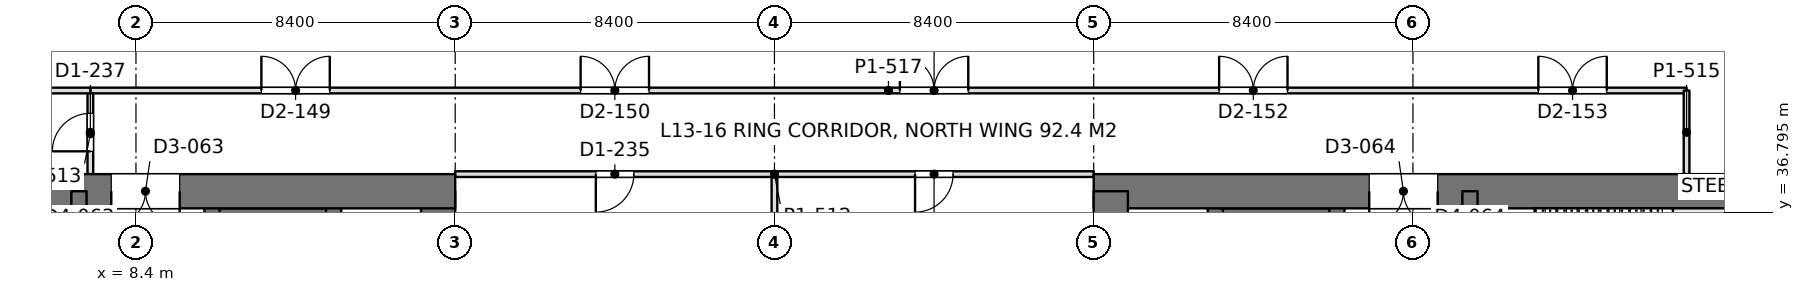
"""IFC4 building model, lengths in metres.
Left out: names, types, materials, properties, quantities, classifications, styles, units other than length and angle.
Written with IfcOpenShell. Run it as: python <this file> out.ifc"""

import sys

from ifc_helpers import new_model, si_unit, direction, frame, frame_2d, origin, place, context, subcontext, project, spatial, rectangle, extrude, element, fill, save


model = new_model("IFC4")
c1 = context("Model", 3, precision=1e-05, world=origin(), true_north=direction((0.0, 1.0)))
c2 = subcontext(c1, "Body", "Model", "MODEL_VIEW")
j1 = project(units=[si_unit("LENGTHUNIT", "METRE"), si_unit("PLANEANGLEUNIT", "RADIAN")], contexts=[c1])
p1 = place(None, origin())
s1 = spatial("IfcSite", under=j1, at=p1, CompositionType="ELEMENT")
p2 = place(p1, origin())
s2 = spatial("IfcBuilding", under=s1, at=p2, CompositionType="ELEMENT")
p3 = place(p2, frame((0.0, 0.0, 59.4)))
s3 = spatial("IfcBuildingStorey", under=s2, at=p3, CompositionType="ELEMENT", Elevation=59.4)
p4 = place(p3, frame((-1.2, 37.35, 0.0), z_axis=(0.0, 0.0, 1.0), x_axis=(1.0, 0.0, 0.0)))
e1 = element("IfcWall", 1, at=p4, inside=s3, PredefinedType="SHEAR", context=c2, shape_type="SweptSolid", body=[
    extrude(rectangle(XDim=18.0, YDim=0.9, at=frame_2d((9.0, 0.0))), origin(), (0.0, 0.0, 1.0), 4.5),
])
p5 = place(p4, frame((8.95, 0.0, 0.0)))
e2 = element("IfcOpeningElement", 2, at=p5, cuts=e1, PredefinedType="OPENING", context=c2, shape_type="SweptSolid", body=[
    extrude(rectangle(XDim=1.8, YDim=2.4, at=frame_2d((0.9, 1.2))), frame((0.0, 0.46, 0.0), z_axis=(0.0, -1.0, 0.0), x_axis=(1.0, 0.0, 0.0)), (0.0, 0.0, 1.0), 0.92),
])
p6 = place(p3, frame((16.35, 13.05, 0.0), z_axis=(0.0, 0.0, 1.0), x_axis=(0.0, 1.0, 0.0)))
e3 = element("IfcWall", 3, at=p6, inside=s3, PredefinedType="SHEAR", context=c2, shape_type="SweptSolid", body=[
    extrude(rectangle(XDim=24.3, YDim=0.9, at=frame_2d((12.15, 0.0))), origin(), (0.0, 0.0, 1.0), 4.5),
])
p7 = place(p3, frame((6.9, 13.05, 0.0), z_axis=(0.0, 0.0, 1.0), x_axis=(0.0, 1.0, 0.0)))
e4 = element("IfcWall", 4, at=p7, inside=s3, PredefinedType="SHEAR", context=c2, shape_type="SweptSolid", body=[
    extrude(rectangle(XDim=24.3, YDim=0.4, at=frame_2d((12.15, 0.0))), origin(), (0.0, 0.0, 1.0), 4.5),
])
p8 = place(p7, frame((1.3, 0.0, 0.0)))
e5 = element("IfcOpeningElement", 5, at=p8, cuts=e4, PredefinedType="OPENING", context=c2, shape_type="SweptSolid", body=[
    extrude(rectangle(XDim=1.0, YDim=2.2, at=frame_2d((0.5, 1.1))), frame((0.0, 0.21, 0.0), z_axis=(0.0, -1.0, 0.0), x_axis=(1.0, 0.0, 0.0)), (0.0, 0.0, 1.0), 0.42),
])
p9 = place(p7, frame((22.0, 0.0, 0.0)))
e6 = element("IfcOpeningElement", 6, at=p9, cuts=e4, PredefinedType="OPENING", context=c2, shape_type="SweptSolid", body=[
    extrude(rectangle(XDim=1.0, YDim=2.2, at=frame_2d((0.5, 1.1))), frame((0.0, 0.21, 0.0), z_axis=(0.0, -1.0, 0.0), x_axis=(1.0, 0.0, 0.0)), (0.0, 0.0, 1.0), 0.42),
])
p10 = place(p7, frame((5.55, 0.0, 0.0)))
e7 = element("IfcOpeningElement", 7, at=p10, cuts=e4, PredefinedType="OPENING", context=c2, shape_type="SweptSolid", body=[
    extrude(rectangle(XDim=1.0, YDim=2.2, at=frame_2d((0.5, 1.1))), frame((0.0, 0.21, 0.0), z_axis=(0.0, -1.0, 0.0), x_axis=(1.0, 0.0, 0.0)), (0.0, 0.0, 1.0), 0.42),
])
p11 = place(p7, frame((9.55, 0.0, 0.0)))
e8 = element("IfcOpeningElement", 8, at=p11, cuts=e4, PredefinedType="OPENING", context=c2, shape_type="SweptSolid", body=[
    extrude(rectangle(XDim=1.0, YDim=2.2, at=frame_2d((0.5, 1.1))), frame((0.0, 0.21, 0.0), z_axis=(0.0, -1.0, 0.0), x_axis=(1.0, 0.0, 0.0)), (0.0, 0.0, 1.0), 0.42),
])
p12 = place(p7, frame((12.8, 0.0, 0.0)))
e9 = element("IfcOpeningElement", 9, at=p12, cuts=e4, PredefinedType="OPENING", context=c2, shape_type="SweptSolid", body=[
    extrude(rectangle(XDim=1.1, YDim=2.2, at=frame_2d((0.55, 1.1))), frame((0.0, 0.21, 0.0), z_axis=(0.0, -1.0, 0.0), x_axis=(1.0, 0.0, 0.0)), (0.0, 0.0, 1.0), 0.42),
])
p13 = place(p7, frame((15.538, 0.0, 0.0)))
e10 = element("IfcOpeningElement", 10, at=p13, cuts=e4, PredefinedType="OPENING", context=c2, shape_type="SweptSolid", body=[
    extrude(rectangle(XDim=1.1, YDim=2.2, at=frame_2d((0.55, 1.1))), frame((0.0, 0.21, 0.0), z_axis=(0.0, -1.0, 0.0), x_axis=(1.0, 0.0, 0.0)), (0.0, 0.0, 1.0), 0.42),
])
p14 = place(p7, frame((18.262, 0.0, 0.0)))
e11 = element("IfcOpeningElement", 11, at=p14, cuts=e4, PredefinedType="OPENING", context=c2, shape_type="SweptSolid", body=[
    extrude(rectangle(XDim=1.1, YDim=2.2, at=frame_2d((0.55, 1.1))), frame((0.0, 0.21, 0.0), z_axis=(0.0, -1.0, 0.0), x_axis=(1.0, 0.0, 0.0)), (0.0, 0.0, 1.0), 0.42),
])
p15 = place(p3, frame((10.4, 13.05, 0.0), z_axis=(0.0, 0.0, 1.0), x_axis=(0.0, 1.0, 0.0)))
e12 = element("IfcWall", 12, at=p15, inside=s3, PredefinedType="SHEAR", context=c2, shape_type="SweptSolid", body=[
    extrude(rectangle(XDim=24.3, YDim=0.4, at=frame_2d((12.15, 0.0))), origin(), (0.0, 0.0, 1.0), 4.5),
])
p16 = place(p15, frame((1.5, 0.0, 0.0)))
e13 = element("IfcOpeningElement", 13, at=p16, cuts=e12, PredefinedType="OPENING", context=c2, shape_type="SweptSolid", body=[
    extrude(rectangle(XDim=1.1, YDim=2.2, at=frame_2d((0.55, 1.1))), frame((0.0, 0.21, 0.0), z_axis=(0.0, -1.0, 0.0), x_axis=(1.0, 0.0, 0.0)), (0.0, 0.0, 1.0), 0.42),
])
p17 = place(p15, frame((4.35, 0.0, 0.0)))
e14 = element("IfcOpeningElement", 14, at=p17, cuts=e12, PredefinedType="OPENING", context=c2, shape_type="SweptSolid", body=[
    extrude(rectangle(XDim=1.1, YDim=2.2, at=frame_2d((0.55, 1.1))), frame((0.0, 0.21, 0.0), z_axis=(0.0, -1.0, 0.0), x_axis=(1.0, 0.0, 0.0)), (0.0, 0.0, 1.0), 0.42),
])
p18 = place(p15, frame((7.2, 0.0, 0.0)))
e15 = element("IfcOpeningElement", 15, at=p18, cuts=e12, PredefinedType="OPENING", context=c2, shape_type="SweptSolid", body=[
    extrude(rectangle(XDim=1.1, YDim=2.2, at=frame_2d((0.55, 1.1))), frame((0.0, 0.21, 0.0), z_axis=(0.0, -1.0, 0.0), x_axis=(1.0, 0.0, 0.0)), (0.0, 0.0, 1.0), 0.42),
])
p19 = place(p15, frame((21.45, 0.0, 0.0)))
e16 = element("IfcOpeningElement", 16, at=p19, cuts=e12, PredefinedType="OPENING", context=c2, shape_type="SweptSolid", body=[
    extrude(rectangle(XDim=1.1, YDim=2.2, at=frame_2d((0.55, 1.1))), frame((0.0, 0.21, 0.0), z_axis=(0.0, -1.0, 0.0), x_axis=(1.0, 0.0, 0.0)), (0.0, 0.0, 1.0), 0.42),
])
p20 = place(p3, frame((13.6, 13.05, 0.0), z_axis=(0.0, 0.0, 1.0), x_axis=(0.0, 1.0, 0.0)))
e17 = element("IfcWall", 17, at=p20, inside=s3, PredefinedType="SHEAR", context=c2, shape_type="SweptSolid", body=[
    extrude(rectangle(XDim=24.3, YDim=0.4, at=frame_2d((12.15, 0.0))), origin(), (0.0, 0.0, 1.0), 4.5),
])
p21 = place(p3, frame((10.4, 36.625, 0.0), z_axis=(0.0, 0.0, 1.0), x_axis=(1.0, 0.0, 0.0)))
e18 = element("IfcWall", 18, at=p21, inside=s3, PredefinedType="SHEAR", context=c2, shape_type="SweptSolid", body=[
    extrude(rectangle(XDim=3.2, YDim=0.55, at=frame_2d((1.6, 0.0))), origin(), (0.0, 0.0, 1.0), 4.5),
])
p22 = place(p3, frame((33.6, 37.35, 0.0), z_axis=(0.0, 0.0, 1.0), x_axis=(1.0, 0.0, 0.0)))
e19 = element("IfcWall", 19, at=p22, inside=s3, PredefinedType="SHEAR", context=c2, shape_type="SweptSolid", body=[
    extrude(rectangle(XDim=18.0, YDim=0.9, at=frame_2d((9.0, 0.0))), origin(), (0.0, 0.0, 1.0), 4.5),
])
p23 = place(p22, frame((7.25, 0.0, 0.0)))
e20 = element("IfcOpeningElement", 20, at=p23, cuts=e19, PredefinedType="OPENING", context=c2, shape_type="SweptSolid", body=[
    extrude(rectangle(XDim=1.8, YDim=2.4, at=frame_2d((0.9, 1.2))), frame((0.0, 0.46, 0.0), z_axis=(0.0, -1.0, 0.0), x_axis=(1.0, 0.0, 0.0)), (0.0, 0.0, 1.0), 0.92),
])
p24 = place(p3, frame((34.05, 13.05, 0.0), z_axis=(0.0, 0.0, 1.0), x_axis=(0.0, 1.0, 0.0)))
e21 = element("IfcWall", 21, at=p24, inside=s3, PredefinedType="SHEAR", context=c2, shape_type="SweptSolid", body=[
    extrude(rectangle(XDim=24.3, YDim=0.9, at=frame_2d((12.15, 0.0))), origin(), (0.0, 0.0, 1.0), 4.5),
])
p25 = place(p3, frame((43.5, 13.05, 0.0), z_axis=(0.0, 0.0, 1.0), x_axis=(0.0, 1.0, 0.0)))
e22 = element("IfcWall", 22, at=p25, inside=s3, PredefinedType="SHEAR", context=c2, shape_type="SweptSolid", body=[
    extrude(rectangle(XDim=24.3, YDim=0.4, at=frame_2d((12.15, 0.0))), origin(), (0.0, 0.0, 1.0), 4.5),
])
p26 = place(p25, frame((1.3, 0.0, 0.0)))
e23 = element("IfcOpeningElement", 23, at=p26, cuts=e22, PredefinedType="OPENING", context=c2, shape_type="SweptSolid", body=[
    extrude(rectangle(XDim=1.0, YDim=2.2, at=frame_2d((0.5, 1.1))), frame((0.0, 0.21, 0.0), z_axis=(0.0, -1.0, 0.0), x_axis=(1.0, 0.0, 0.0)), (0.0, 0.0, 1.0), 0.42),
])
p27 = place(p25, frame((22.0, 0.0, 0.0)))
e24 = element("IfcOpeningElement", 24, at=p27, cuts=e22, PredefinedType="OPENING", context=c2, shape_type="SweptSolid", body=[
    extrude(rectangle(XDim=1.0, YDim=2.2, at=frame_2d((0.5, 1.1))), frame((0.0, 0.21, 0.0), z_axis=(0.0, -1.0, 0.0), x_axis=(1.0, 0.0, 0.0)), (0.0, 0.0, 1.0), 0.42),
])
p28 = place(p25, frame((5.55, 0.0, 0.0)))
e25 = element("IfcOpeningElement", 25, at=p28, cuts=e22, PredefinedType="OPENING", context=c2, shape_type="SweptSolid", body=[
    extrude(rectangle(XDim=1.0, YDim=2.2, at=frame_2d((0.5, 1.1))), frame((0.0, 0.21, 0.0), z_axis=(0.0, -1.0, 0.0), x_axis=(1.0, 0.0, 0.0)), (0.0, 0.0, 1.0), 0.42),
])
p29 = place(p25, frame((9.55, 0.0, 0.0)))
e26 = element("IfcOpeningElement", 26, at=p29, cuts=e22, PredefinedType="OPENING", context=c2, shape_type="SweptSolid", body=[
    extrude(rectangle(XDim=1.0, YDim=2.2, at=frame_2d((0.5, 1.1))), frame((0.0, 0.21, 0.0), z_axis=(0.0, -1.0, 0.0), x_axis=(1.0, 0.0, 0.0)), (0.0, 0.0, 1.0), 0.42),
])
p30 = place(p25, frame((12.8, 0.0, 0.0)))
e27 = element("IfcOpeningElement", 27, at=p30, cuts=e22, PredefinedType="OPENING", context=c2, shape_type="SweptSolid", body=[
    extrude(rectangle(XDim=1.1, YDim=2.2, at=frame_2d((0.55, 1.1))), frame((0.0, 0.21, 0.0), z_axis=(0.0, -1.0, 0.0), x_axis=(1.0, 0.0, 0.0)), (0.0, 0.0, 1.0), 0.42),
])
p31 = place(p25, frame((15.538, 0.0, 0.0)))
e28 = element("IfcOpeningElement", 28, at=p31, cuts=e22, PredefinedType="OPENING", context=c2, shape_type="SweptSolid", body=[
    extrude(rectangle(XDim=1.1, YDim=2.2, at=frame_2d((0.55, 1.1))), frame((0.0, 0.21, 0.0), z_axis=(0.0, -1.0, 0.0), x_axis=(1.0, 0.0, 0.0)), (0.0, 0.0, 1.0), 0.42),
])
p32 = place(p25, frame((18.262, 0.0, 0.0)))
e29 = element("IfcOpeningElement", 29, at=p32, cuts=e22, PredefinedType="OPENING", context=c2, shape_type="SweptSolid", body=[
    extrude(rectangle(XDim=1.1, YDim=2.2, at=frame_2d((0.55, 1.1))), frame((0.0, 0.21, 0.0), z_axis=(0.0, -1.0, 0.0), x_axis=(1.0, 0.0, 0.0)), (0.0, 0.0, 1.0), 0.42),
])
p33 = place(p3, frame((40.0, 13.05, 0.0), z_axis=(0.0, 0.0, 1.0), x_axis=(0.0, 1.0, 0.0)))
e30 = element("IfcWall", 30, at=p33, inside=s3, PredefinedType="SHEAR", context=c2, shape_type="SweptSolid", body=[
    extrude(rectangle(XDim=24.3, YDim=0.4, at=frame_2d((12.15, 0.0))), origin(), (0.0, 0.0, 1.0), 4.5),
])
p34 = place(p33, frame((1.5, 0.0, 0.0)))
e31 = element("IfcOpeningElement", 31, at=p34, cuts=e30, PredefinedType="OPENING", context=c2, shape_type="SweptSolid", body=[
    extrude(rectangle(XDim=1.1, YDim=2.2, at=frame_2d((0.55, 1.1))), frame((0.0, 0.21, 0.0), z_axis=(0.0, -1.0, 0.0), x_axis=(1.0, 0.0, 0.0)), (0.0, 0.0, 1.0), 0.42),
])
p35 = place(p33, frame((4.35, 0.0, 0.0)))
e32 = element("IfcOpeningElement", 32, at=p35, cuts=e30, PredefinedType="OPENING", context=c2, shape_type="SweptSolid", body=[
    extrude(rectangle(XDim=1.1, YDim=2.2, at=frame_2d((0.55, 1.1))), frame((0.0, 0.21, 0.0), z_axis=(0.0, -1.0, 0.0), x_axis=(1.0, 0.0, 0.0)), (0.0, 0.0, 1.0), 0.42),
])
p36 = place(p33, frame((7.2, 0.0, 0.0)))
e33 = element("IfcOpeningElement", 33, at=p36, cuts=e30, PredefinedType="OPENING", context=c2, shape_type="SweptSolid", body=[
    extrude(rectangle(XDim=1.1, YDim=2.2, at=frame_2d((0.55, 1.1))), frame((0.0, 0.21, 0.0), z_axis=(0.0, -1.0, 0.0), x_axis=(1.0, 0.0, 0.0)), (0.0, 0.0, 1.0), 0.42),
])
p37 = place(p33, frame((21.45, 0.0, 0.0)))
e34 = element("IfcOpeningElement", 34, at=p37, cuts=e30, PredefinedType="OPENING", context=c2, shape_type="SweptSolid", body=[
    extrude(rectangle(XDim=1.1, YDim=2.2, at=frame_2d((0.55, 1.1))), frame((0.0, 0.21, 0.0), z_axis=(0.0, -1.0, 0.0), x_axis=(1.0, 0.0, 0.0)), (0.0, 0.0, 1.0), 0.42),
])
p38 = place(p3, frame((36.8, 13.05, 0.0), z_axis=(0.0, 0.0, 1.0), x_axis=(0.0, 1.0, 0.0)))
e35 = element("IfcWall", 35, at=p38, inside=s3, PredefinedType="SHEAR", context=c2, shape_type="SweptSolid", body=[
    extrude(rectangle(XDim=24.3, YDim=0.4, at=frame_2d((12.15, 0.0))), origin(), (0.0, 0.0, 1.0), 4.5),
])
p39 = place(p3, frame((40.0, 36.625, 0.0), z_axis=(0.0, 0.0, 1.0), x_axis=(-1.0, 0.0, 0.0)))
e36 = element("IfcWall", 36, at=p39, inside=s3, PredefinedType="SHEAR", context=c2, shape_type="SweptSolid", body=[
    extrude(rectangle(XDim=3.2, YDim=0.55, at=frame_2d((1.6, 0.0))), origin(), (0.0, 0.0, 1.0), 4.5),
])
p40 = place(p3, frame((7.198, 40.0, 0.0), z_axis=(0.0, 0.0, 1.0), x_axis=(1.0, 0.0, 0.0)))
e37 = element("IfcWall", 37, at=p40, inside=s3, PredefinedType="PARTITIONING", context=c2, shape_type="SweptSolid", body=[
    extrude(rectangle(XDim=42.002, YDim=0.15, at=frame_2d((21.001, 0.0))), origin(), (0.0, 0.0, 1.0), 3.74),
])
p41 = place(p40, frame((4.502, 0.0, 0.0)))
e38 = element("IfcOpeningElement", 38, at=p41, cuts=e37, PredefinedType="OPENING", context=c2, shape_type="SweptSolid", body=[
    extrude(rectangle(XDim=1.8, YDim=2.2, at=frame_2d((0.9, 1.1))), frame((0.0, 0.085, 0.0), z_axis=(0.0, -1.0, 0.0), x_axis=(1.0, 0.0, 0.0)), (0.0, 0.0, 1.0), 0.17),
])
p42 = place(p40, frame((12.902, 0.0, 0.0)))
e39 = element("IfcOpeningElement", 39, at=p42, cuts=e37, PredefinedType="OPENING", context=c2, shape_type="SweptSolid", body=[
    extrude(rectangle(XDim=1.8, YDim=2.2, at=frame_2d((0.9, 1.1))), frame((0.0, 0.085, 0.0), z_axis=(0.0, -1.0, 0.0), x_axis=(1.0, 0.0, 0.0)), (0.0, 0.0, 1.0), 0.17),
])
p43 = place(p40, frame((21.302, 0.0, 0.0)))
e40 = element("IfcOpeningElement", 40, at=p43, cuts=e37, PredefinedType="OPENING", context=c2, shape_type="SweptSolid", body=[
    extrude(rectangle(XDim=1.8, YDim=2.2, at=frame_2d((0.9, 1.1))), frame((0.0, 0.085, 0.0), z_axis=(0.0, -1.0, 0.0), x_axis=(1.0, 0.0, 0.0)), (0.0, 0.0, 1.0), 0.17),
])
p44 = place(p40, frame((29.702, 0.0, 0.0)))
e41 = element("IfcOpeningElement", 41, at=p44, cuts=e37, PredefinedType="OPENING", context=c2, shape_type="SweptSolid", body=[
    extrude(rectangle(XDim=1.8, YDim=2.2, at=frame_2d((0.9, 1.1))), frame((0.0, 0.085, 0.0), z_axis=(0.0, -1.0, 0.0), x_axis=(1.0, 0.0, 0.0)), (0.0, 0.0, 1.0), 0.17),
])
p45 = place(p40, frame((38.102, 0.0, 0.0)))
e42 = element("IfcOpeningElement", 42, at=p45, cuts=e37, PredefinedType="OPENING", context=c2, shape_type="SweptSolid", body=[
    extrude(rectangle(XDim=1.8, YDim=2.2, at=frame_2d((0.9, 1.1))), frame((0.0, 0.085, 0.0), z_axis=(0.0, -1.0, 0.0), x_axis=(1.0, 0.0, 0.0)), (0.0, 0.0, 1.0), 0.17),
])
p46 = place(p3, frame((7.2, 37.8, 0.0), z_axis=(0.0, 0.0, 1.0), x_axis=(0.0, 1.0, 0.0)))
e43 = element("IfcWall", 43, at=p46, inside=s3, PredefinedType="PARTITIONING", context=c2, shape_type="SweptSolid", body=[
    extrude(rectangle(XDim=2.126, YDim=0.15, at=frame_2d((1.063, 0.0))), origin(), (0.0, 0.0, 1.0), 4.34),
])
p47 = place(p46, frame((0.6, 0.0, 0.0)))
e44 = element("IfcOpeningElement", 44, at=p47, cuts=e43, PredefinedType="OPENING", context=c2, shape_type="SweptSolid", body=[
    extrude(rectangle(XDim=1.0, YDim=2.2, at=frame_2d((0.5, 1.1))), frame((0.0, 0.085, 0.0), z_axis=(0.0, -1.0, 0.0), x_axis=(1.0, 0.0, 0.0)), (0.0, 0.0, 1.0), 0.17),
])
p48 = place(p3, frame((49.2, 37.8, 0.0), z_axis=(0.0, 0.0, 1.0), x_axis=(0.0, 1.0, 0.0)))
e45 = element("IfcWall", 45, at=p48, inside=s3, PredefinedType="PARTITIONING", context=c2, shape_type="SweptSolid", body=[
    extrude(rectangle(XDim=2.2, YDim=0.15, at=frame_2d((1.1, 0.0))), origin(), (0.0, 0.0, 1.0), 4.34),
])
p49 = place(p3, frame((1.2, 40.0, 0.0), z_axis=(0.0, 0.0, 1.0), x_axis=(1.0, 0.0, 0.0)))
e46 = element("IfcWall", 46, at=p49, inside=s3, PredefinedType="PARTITIONING", context=c2, shape_type="SweptSolid", body=[
    extrude(rectangle(XDim=6.002, YDim=0.15, at=frame_2d((3.001, 0.0))), origin(), (0.0, 0.0, 1.0), 3.98),
])
p50 = place(p3, frame((25.2, 34.199, 0.0), z_axis=(0.0, 0.0, 1.0), x_axis=(0.0, 1.0, 0.0)))
e47 = element("IfcWall", 47, at=p50, inside=s3, PredefinedType="PARTITIONING", context=c2, shape_type="SweptSolid", body=[
    extrude(rectangle(XDim=3.527, YDim=0.15, at=frame_2d((1.764, 0.0))), origin(), (0.0, 0.0, 1.0), 3.74),
])
p51 = place(p3, frame((16.798, 37.8, 0.0), z_axis=(0.0, 0.0, 1.0), x_axis=(1.0, 0.0, 0.0)))
e48 = element("IfcWall", 48, at=p51, inside=s3, PredefinedType="PARTITIONING", context=c2, shape_type="SweptSolid", body=[
    extrude(rectangle(XDim=16.804, YDim=0.15, at=frame_2d((8.402, 0.0))), origin(), (0.0, 0.0, 1.0), 3.74),
])
p52 = place(p51, frame((3.702, 0.0, 0.0)))
e49 = element("IfcOpeningElement", 49, at=p52, cuts=e48, PredefinedType="OPENING", context=c2, shape_type="SweptSolid", body=[
    extrude(rectangle(XDim=1.0, YDim=2.2, at=frame_2d((0.5, 1.1))), frame((0.0, 0.085, 0.0), z_axis=(0.0, -1.0, 0.0), x_axis=(1.0, 0.0, 0.0)), (0.0, 0.0, 1.0), 0.17),
])
p53 = place(p51, frame((12.102, 0.0, 0.0)))
e50 = element("IfcOpeningElement", 50, at=p53, cuts=e48, PredefinedType="OPENING", context=c2, shape_type="SweptSolid", body=[
    extrude(rectangle(XDim=1.0, YDim=2.2, at=frame_2d((0.5, 1.1))), frame((0.0, 0.085, 0.0), z_axis=(0.0, -1.0, 0.0), x_axis=(1.0, 0.0, 0.0)), (0.0, 0.0, 1.0), 0.17),
])
p54 = place(p5, frame((1.8, 0.0, 0.0), z_axis=(0.0, 0.0, 1.0), x_axis=(-1.0, 0.0, 0.0)))
e51 = element("IfcDoor", 51, at=p54, inside=s3, OperationType="DOUBLE_DOOR_SINGLE_SWING", PredefinedType="DOOR", context=c2, shape_type="SweptSolid", body=[
    extrude(rectangle(XDim=1.8, YDim=2.4, at=frame_2d((0.9, 1.2))), frame((0.0, 0.025, 0.0), z_axis=(0.0, -1.0, 0.0), x_axis=(1.0, 0.0, 0.0)), (0.0, 0.0, 1.0), 0.05),
])
fill(e2, e51)
p55 = place(p23, frame((1.8, 0.0, 0.0), z_axis=(0.0, 0.0, 1.0), x_axis=(-1.0, 0.0, 0.0)))
e52 = element("IfcDoor", 52, at=p55, inside=s3, OperationType="DOUBLE_DOOR_SINGLE_SWING", PredefinedType="DOOR", context=c2, shape_type="SweptSolid", body=[
    extrude(rectangle(XDim=1.8, YDim=2.4, at=frame_2d((0.9, 1.2))), frame((0.0, 0.025, 0.0), z_axis=(0.0, -1.0, 0.0), x_axis=(1.0, 0.0, 0.0)), (0.0, 0.0, 1.0), 0.05),
])
fill(e20, e52)
p56 = place(p41, origin())
e53 = element("IfcDoor", 53, at=p56, inside=s3, OperationType="DOUBLE_DOOR_SINGLE_SWING", PredefinedType="DOOR", context=c2, shape_type="SweptSolid", body=[
    extrude(rectangle(XDim=1.8, YDim=2.2, at=frame_2d((0.9, 1.1))), frame((0.0, 0.025, 0.0), z_axis=(0.0, -1.0, 0.0), x_axis=(1.0, 0.0, 0.0)), (0.0, 0.0, 1.0), 0.05),
])
fill(e38, e53)
p57 = place(p42, origin())
e54 = element("IfcDoor", 54, at=p57, inside=s3, OperationType="DOUBLE_DOOR_SINGLE_SWING", PredefinedType="DOOR", context=c2, shape_type="SweptSolid", body=[
    extrude(rectangle(XDim=1.8, YDim=2.2, at=frame_2d((0.9, 1.1))), frame((0.0, 0.025, 0.0), z_axis=(0.0, -1.0, 0.0), x_axis=(1.0, 0.0, 0.0)), (0.0, 0.0, 1.0), 0.05),
])
fill(e39, e54)
p58 = place(p43, origin())
e55 = element("IfcDoor", 55, at=p58, inside=s3, OperationType="DOUBLE_DOOR_SINGLE_SWING", PredefinedType="DOOR", context=c2, shape_type="SweptSolid", body=[
    extrude(rectangle(XDim=1.8, YDim=2.2, at=frame_2d((0.9, 1.1))), frame((0.0, 0.025, 0.0), z_axis=(0.0, -1.0, 0.0), x_axis=(1.0, 0.0, 0.0)), (0.0, 0.0, 1.0), 0.05),
])
fill(e40, e55)
p59 = place(p44, origin())
e56 = element("IfcDoor", 56, at=p59, inside=s3, OperationType="DOUBLE_DOOR_SINGLE_SWING", PredefinedType="DOOR", context=c2, shape_type="SweptSolid", body=[
    extrude(rectangle(XDim=1.8, YDim=2.2, at=frame_2d((0.9, 1.1))), frame((0.0, 0.025, 0.0), z_axis=(0.0, -1.0, 0.0), x_axis=(1.0, 0.0, 0.0)), (0.0, 0.0, 1.0), 0.05),
])
fill(e41, e56)
p60 = place(p45, origin())
e57 = element("IfcDoor", 57, at=p60, inside=s3, OperationType="DOUBLE_DOOR_SINGLE_SWING", PredefinedType="DOOR", context=c2, shape_type="SweptSolid", body=[
    extrude(rectangle(XDim=1.8, YDim=2.2, at=frame_2d((0.9, 1.1))), frame((0.0, 0.025, 0.0), z_axis=(0.0, -1.0, 0.0), x_axis=(1.0, 0.0, 0.0)), (0.0, 0.0, 1.0), 0.05),
])
fill(e42, e57)
p61 = place(p47, origin())
e58 = element("IfcDoor", 58, at=p61, inside=s3, OperationType="SINGLE_SWING_LEFT", PredefinedType="DOOR", context=c2, shape_type="SweptSolid", body=[
    extrude(rectangle(XDim=1.0, YDim=2.2, at=frame_2d((0.5, 1.1))), frame((0.0, 0.025, 0.0), z_axis=(0.0, -1.0, 0.0), x_axis=(1.0, 0.0, 0.0)), (0.0, 0.0, 1.0), 0.05),
])
fill(e44, e58)
p62 = place(p52, frame((1.0, 0.0, 0.0), z_axis=(0.0, 0.0, 1.0), x_axis=(-1.0, 0.0, 0.0)))
e59 = element("IfcDoor", 59, at=p62, inside=s3, OperationType="SINGLE_SWING_RIGHT", PredefinedType="DOOR", context=c2, shape_type="SweptSolid", body=[
    extrude(rectangle(XDim=1.0, YDim=2.2, at=frame_2d((0.5, 1.1))), frame((0.0, 0.025, 0.0), z_axis=(0.0, -1.0, 0.0), x_axis=(1.0, 0.0, 0.0)), (0.0, 0.0, 1.0), 0.05),
])
fill(e49, e59)
p63 = place(p53, frame((1.0, 0.0, 0.0), z_axis=(0.0, 0.0, 1.0), x_axis=(-1.0, 0.0, 0.0)))
e60 = element("IfcDoor", 60, at=p63, inside=s3, OperationType="SINGLE_SWING_RIGHT", PredefinedType="DOOR", context=c2, shape_type="SweptSolid", body=[
    extrude(rectangle(XDim=1.0, YDim=2.2, at=frame_2d((0.5, 1.1))), frame((0.0, 0.025, 0.0), z_axis=(0.0, -1.0, 0.0), x_axis=(1.0, 0.0, 0.0)), (0.0, 0.0, 1.0), 0.05),
])
fill(e50, e60)
save(model, sys.argv[1])
